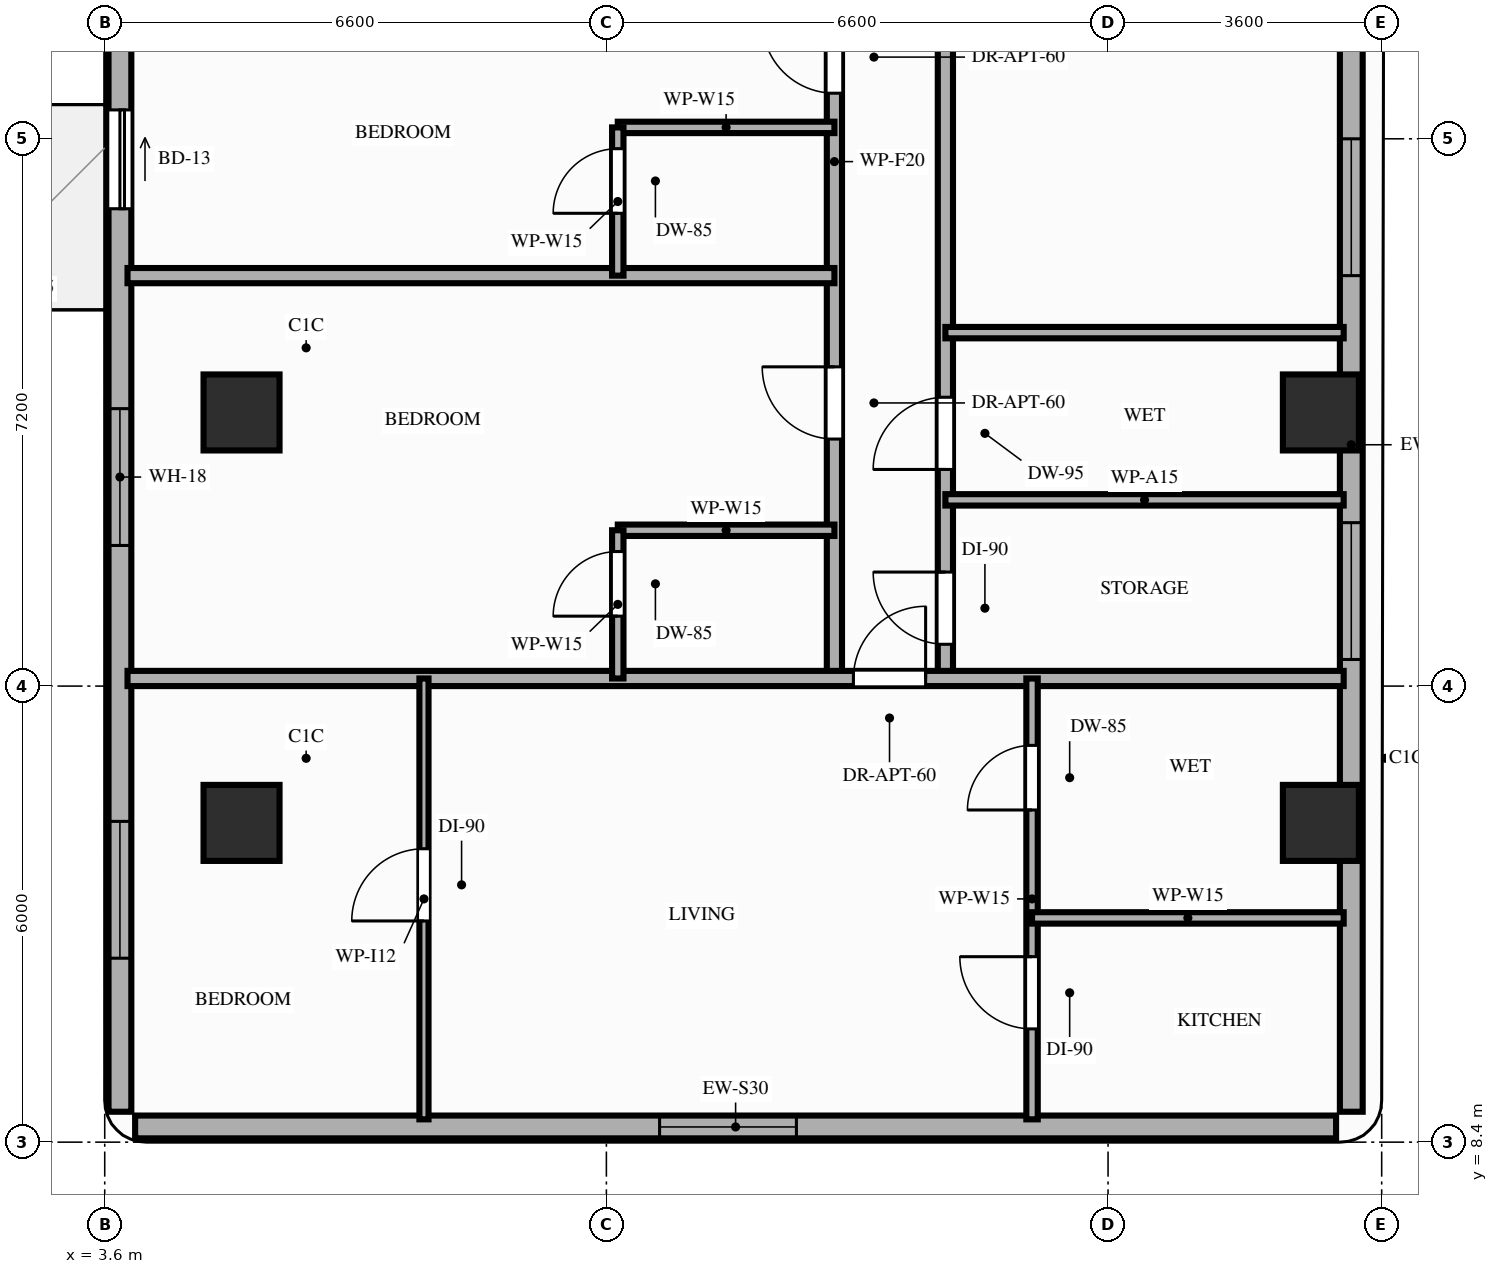
"""IFC4 building model, lengths in metres.
Left out: names, types, materials, properties, quantities, classifications, styles, units other than length and angle.
Written with IfcOpenShell. Run it as: python <this file> out.ifc"""

import sys

from ifc_helpers import new_model, si_unit, direction, frame, frame_2d, origin, origin_2d, place, context, subcontext, project, spatial, rectangle, extrude, element, fill, save


model = new_model("IFC4")
c1 = context("Model", 3, precision=1e-05, world=origin(), true_north=direction((0.0, 1.0)))
c2 = subcontext(c1, "Body", "Model", "MODEL_VIEW")
j1 = project(units=[si_unit("LENGTHUNIT", "METRE"), si_unit("PLANEANGLEUNIT", "RADIAN")], contexts=[c1])
p1 = place(None, origin())
s1 = spatial("IfcSite", under=j1, at=p1, CompositionType="ELEMENT")
p2 = place(p1, origin())
s2 = spatial("IfcBuilding", under=s1, at=p2, CompositionType="ELEMENT")
p3 = place(p2, frame((0.0, 0.0, 110.6)))
s3 = spatial("IfcBuildingStorey", under=s2, at=p3, CompositionType="ELEMENT", Elevation=110.6)
for number, where, z_axis, x_axis in (
    (1, (5.4, 12.6, 0.0), (0.0, 0.0, 1.0), (1.0, 0.0, 0.0)),
    (2, (19.6, 12.6, 0.0), (0.0, 0.0, 1.0), (1.0, 0.0, 0.0)),
    (3, (5.4, 18.0, 0.0), (0.0, 0.0, 1.0), (1.0, 0.0, 0.0)),
    (4, (19.6, 18.0, 0.0), (0.0, 0.0, 1.0), (1.0, 0.0, 0.0)),
):
    element("IfcColumn", number, at=place(p3, frame(where, z_axis=z_axis, x_axis=x_axis)), inside=s3, PredefinedType="COLUMN", context=c2, shape_type="SweptSolid", body=[
        extrude(rectangle(XDim=1.0, YDim=1.0, at=origin_2d()), origin(), (0.0, 0.0, 1.0), 3.2),
    ])
p4 = place(p3, frame((4.0, 8.6, 0.0), z_axis=(0.0, 0.0, 1.0), x_axis=(1.0, 0.0, 0.0)))
e5 = element("IfcWall", 5, at=p4, inside=s3, PredefinedType="STANDARD", context=c2, shape_type="SweptSolid", body=[
    extrude(rectangle(XDim=15.8, YDim=0.3, at=frame_2d((7.9, 0.0))), origin(), (0.0, 0.0, 1.0), 3.02),
])
p5 = place(p4, frame((6.9, 0.0, 0.85)))
e6 = element("IfcOpeningElement", 6, at=p5, cuts=e5, PredefinedType="OPENING", context=c2, shape_type="SweptSolid", body=[
    extrude(rectangle(XDim=1.8, YDim=1.75, at=frame_2d((0.9, 0.875))), frame((0.0, 0.16, 0.0), z_axis=(0.0, -1.0, 0.0), x_axis=(1.0, 0.0, 0.0)), (0.0, 0.0, 1.0), 0.32),
])
p6 = place(p3, frame((3.8, 42.1, 0.0), z_axis=(0.0, 0.0, 1.0), x_axis=(0.0, -1.0, 0.0)))
e7 = element("IfcWall", 7, at=p6, inside=s3, PredefinedType="STANDARD", context=c2, shape_type="SweptSolid", body=[
    extrude(rectangle(XDim=33.3, YDim=0.3, at=frame_2d((16.65, 0.0))), origin(), (0.0, 0.0, 1.0), 2.7),
])
p7 = place(p6, frame((20.12, 0.0, 0.0)))
e8 = element("IfcOpeningElement", 8, at=p7, cuts=e7, PredefinedType="OPENING", context=c2, shape_type="SweptSolid", body=[
    extrude(rectangle(XDim=1.3, YDim=2.08, at=frame_2d((0.65, 1.04))), frame((0.0, 0.16, 0.0), z_axis=(0.0, -1.0, 0.0), x_axis=(1.0, 0.0, 0.0)), (0.0, 0.0, 1.0), 0.32),
])
p8 = place(p6, frame((24.05, 0.0, 0.85)))
e9 = element("IfcOpeningElement", 9, at=p8, cuts=e7, PredefinedType="OPENING", context=c2, shape_type="SweptSolid", body=[
    extrude(rectangle(XDim=1.8, YDim=1.6, at=frame_2d((0.9, 0.8))), frame((0.0, 0.16, 0.0), z_axis=(0.0, -1.0, 0.0), x_axis=(1.0, 0.0, 0.0)), (0.0, 0.0, 1.0), 0.32),
])
p9 = place(p6, frame((29.48, 0.0, 0.85)))
e10 = element("IfcOpeningElement", 10, at=p9, cuts=e7, PredefinedType="OPENING", context=c2, shape_type="SweptSolid", body=[
    extrude(rectangle(XDim=1.8, YDim=1.6, at=frame_2d((0.9, 0.8))), frame((0.0, 0.16, 0.0), z_axis=(0.0, -1.0, 0.0), x_axis=(1.0, 0.0, 0.0)), (0.0, 0.0, 1.0), 0.32),
])
p10 = place(p6, frame((15.1, 0.0, 0.85)))
e11 = element("IfcOpeningElement", 11, at=p10, cuts=e7, PredefinedType="OPENING", context=c2, shape_type="SweptSolid", body=[
    extrude(rectangle(XDim=1.8, YDim=1.6, at=frame_2d((0.9, 0.8))), frame((0.0, 0.16, 0.0), z_axis=(0.0, -1.0, 0.0), x_axis=(1.0, 0.0, 0.0)), (0.0, 0.0, 1.0), 0.32),
])
p11 = place(p6, frame((9.9, 0.0, 0.85)))
e12 = element("IfcOpeningElement", 12, at=p11, cuts=e7, PredefinedType="OPENING", context=c2, shape_type="SweptSolid", body=[
    extrude(rectangle(XDim=1.8, YDim=1.6, at=frame_2d((0.9, 0.8))), frame((0.0, 0.16, 0.0), z_axis=(0.0, -1.0, 0.0), x_axis=(1.0, 0.0, 0.0)), (0.0, 0.0, 1.0), 0.32),
])
p12 = place(p6, frame((3.8, 0.0, 0.85)))
e13 = element("IfcOpeningElement", 13, at=p12, cuts=e7, PredefinedType="OPENING", context=c2, shape_type="SweptSolid", body=[
    extrude(rectangle(XDim=1.8, YDim=1.6, at=frame_2d((0.9, 0.8))), frame((0.0, 0.16, 0.0), z_axis=(0.0, -1.0, 0.0), x_axis=(1.0, 0.0, 0.0)), (0.0, 0.0, 1.0), 0.32),
])
p13 = place(p3, frame((20.0, 8.8, 0.0), z_axis=(0.0, 0.0, 1.0), x_axis=(0.0, 1.0, 0.0)))
e14 = element("IfcWall", 14, at=p13, inside=s3, PredefinedType="STANDARD", context=c2, shape_type="SweptSolid", body=[
    extrude(rectangle(XDim=17.55, YDim=0.3, at=frame_2d((8.775, 0.0))), origin(), (0.0, 0.0, 1.0), 2.4),
])
p14 = place(p13, frame((5.95, 0.0, 0.85)))
e15 = element("IfcOpeningElement", 15, at=p14, cuts=e14, PredefinedType="OPENING", context=c2, shape_type="SweptSolid", body=[
    extrude(rectangle(XDim=1.8, YDim=1.3, at=frame_2d((0.9, 0.65))), frame((0.0, 0.16, 0.0), z_axis=(0.0, -1.0, 0.0), x_axis=(1.0, 0.0, 0.0)), (0.0, 0.0, 1.0), 0.32),
])
p15 = place(p13, frame((11.0, 0.0, 0.85)))
e16 = element("IfcOpeningElement", 16, at=p15, cuts=e14, PredefinedType="OPENING", context=c2, shape_type="SweptSolid", body=[
    extrude(rectangle(XDim=1.8, YDim=1.3, at=frame_2d((0.9, 0.65))), frame((0.0, 0.16, 0.0), z_axis=(0.0, -1.0, 0.0), x_axis=(1.0, 0.0, 0.0)), (0.0, 0.0, 1.0), 0.32),
])
p16 = place(p3, frame((13.2, 14.5, 0.0), z_axis=(0.0, 0.0, 1.0), x_axis=(0.0, 1.0, 0.0)))
e17 = element("IfcWall", 17, at=p16, inside=s3, PredefinedType="PARTITIONING", context=c2, shape_type="SweptSolid", body=[
    extrude(rectangle(XDim=13.6, YDim=0.2, at=frame_2d((6.8, 0.0))), origin(), (0.0, 0.0, 1.0), 2.4),
])
p17 = place(p16, frame((3.15, 0.0, 0.0)))
e18 = element("IfcOpeningElement", 18, at=p17, cuts=e17, PredefinedType="OPENING", context=c2, shape_type="SweptSolid", body=[
    extrude(rectangle(XDim=0.95, YDim=2.15, at=frame_2d((0.475, 1.075))), frame((0.0, 0.11, 0.0), z_axis=(0.0, -1.0, 0.0), x_axis=(1.0, 0.0, 0.0)), (0.0, 0.0, 1.0), 0.22),
])
p18 = place(p16, frame((7.7, 0.0, 0.0)))
e19 = element("IfcOpeningElement", 19, at=p18, cuts=e17, PredefinedType="OPENING", context=c2, shape_type="SweptSolid", body=[
    extrude(rectangle(XDim=0.95, YDim=2.15, at=frame_2d((0.475, 1.075))), frame((0.0, 0.11, 0.0), z_axis=(0.0, -1.0, 0.0), x_axis=(1.0, 0.0, 0.0)), (0.0, 0.0, 1.0), 0.22),
])
p19 = place(p16, frame((10.88, 0.0, 0.0)))
e20 = element("IfcOpeningElement", 20, at=p19, cuts=e17, PredefinedType="OPENING", context=c2, shape_type="SweptSolid", body=[
    extrude(rectangle(XDim=0.95, YDim=2.15, at=frame_2d((0.475, 1.075))), frame((0.0, 0.11, 0.0), z_axis=(0.0, -1.0, 0.0), x_axis=(1.0, 0.0, 0.0)), (0.0, 0.0, 1.0), 0.22),
])
p20 = place(p3, frame((14.66, 14.5, 0.0), z_axis=(0.0, 0.0, 1.0), x_axis=(0.0, 1.0, 0.0)))
e21 = element("IfcWall", 21, at=p20, inside=s3, PredefinedType="PARTITIONING", context=c2, shape_type="SweptSolid", body=[
    extrude(rectangle(XDim=13.6, YDim=0.2, at=frame_2d((6.8, 0.0))), origin(), (0.0, 0.0, 1.0), 2.4),
])
p21 = place(p20, frame((0.45, 0.0, 0.0)))
e22 = element("IfcOpeningElement", 22, at=p21, cuts=e21, PredefinedType="OPENING", context=c2, shape_type="SweptSolid", body=[
    extrude(rectangle(XDim=0.95, YDim=2.15, at=frame_2d((0.475, 1.075))), frame((0.0, 0.11, 0.0), z_axis=(0.0, -1.0, 0.0), x_axis=(1.0, 0.0, 0.0)), (0.0, 0.0, 1.0), 0.22),
])
p22 = place(p20, frame((2.75, 0.0, 0.0)))
e23 = element("IfcOpeningElement", 23, at=p22, cuts=e21, PredefinedType="OPENING", context=c2, shape_type="SweptSolid", body=[
    extrude(rectangle(XDim=0.95, YDim=2.1, at=frame_2d((0.475, 1.05))), frame((0.0, 0.11, 0.0), z_axis=(0.0, -1.0, 0.0), x_axis=(1.0, 0.0, 0.0)), (0.0, 0.0, 1.0), 0.22),
])
p23 = place(p20, frame((8.58, 0.0, 0.0)))
e24 = element("IfcOpeningElement", 24, at=p23, cuts=e21, PredefinedType="OPENING", context=c2, shape_type="SweptSolid", body=[
    extrude(rectangle(XDim=1.0, YDim=2.15, at=frame_2d((0.5, 1.075))), frame((0.0, 0.11, 0.0), z_axis=(0.0, -1.0, 0.0), x_axis=(1.0, 0.0, 0.0)), (0.0, 0.0, 1.0), 0.22),
])
p24 = place(p3, frame((3.9, 14.5, 0.0), z_axis=(0.0, 0.0, 1.0), x_axis=(1.0, 0.0, 0.0)))
e25 = element("IfcWall", 25, at=p24, inside=s3, PredefinedType="PARTITIONING", context=c2, shape_type="SweptSolid", body=[
    extrude(rectangle(XDim=16.0, YDim=0.2, at=frame_2d((8.0, 0.0))), origin(), (0.0, 0.0, 1.0), 2.4),
])
p25 = place(p24, frame((9.55, 0.0, 0.0)))
e26 = element("IfcOpeningElement", 26, at=p25, cuts=e25, PredefinedType="OPENING", context=c2, shape_type="SweptSolid", body=[
    extrude(rectangle(XDim=0.95, YDim=2.15, at=frame_2d((0.475, 1.075))), frame((0.0, 0.11, 0.0), z_axis=(0.0, -1.0, 0.0), x_axis=(1.0, 0.0, 0.0)), (0.0, 0.0, 1.0), 0.22),
])
p26 = place(p3, frame((10.35, 16.45, 0.0), z_axis=(0.0, 0.0, 1.0), x_axis=(1.0, 0.0, 0.0)))
e27 = element("IfcWall", 27, at=p26, inside=s3, PredefinedType="PARTITIONING", context=c2, shape_type="SweptSolid", body=[
    extrude(rectangle(XDim=2.85, YDim=0.15, at=frame_2d((1.425, 0.0))), origin(), (0.0, 0.0, 1.0), 2.7),
])
p27 = place(p3, frame((10.35, 14.5, 0.0), z_axis=(0.0, 0.0, 1.0), x_axis=(0.0, 1.0, 0.0)))
e28 = element("IfcWall", 28, at=p27, inside=s3, PredefinedType="PARTITIONING", context=c2, shape_type="SweptSolid", body=[
    extrude(rectangle(XDim=1.95, YDim=0.15, at=frame_2d((0.975, 0.0))), origin(), (0.0, 0.0, 1.0), 2.7),
])
p28 = place(p27, frame((0.82, 0.0, 0.0)))
e29 = element("IfcOpeningElement", 29, at=p28, cuts=e28, PredefinedType="OPENING", context=c2, shape_type="SweptSolid", body=[
    extrude(rectangle(XDim=0.85, YDim=2.1, at=frame_2d((0.425, 1.05))), frame((0.0, 0.085, 0.0), z_axis=(0.0, -1.0, 0.0), x_axis=(1.0, 0.0, 0.0)), (0.0, 0.0, 1.0), 0.17),
])
p29 = place(p3, frame((3.9, 19.8, 0.0), z_axis=(0.0, 0.0, 1.0), x_axis=(1.0, 0.0, 0.0)))
e30 = element("IfcWall", 30, at=p29, inside=s3, PredefinedType="PARTITIONING", context=c2, shape_type="SweptSolid", body=[
    extrude(rectangle(XDim=9.3, YDim=0.2, at=frame_2d((4.65, 0.0))), origin(), (0.0, 0.0, 1.0), 2.4),
])
p30 = place(p3, frame((10.35, 21.75, 0.0), z_axis=(0.0, 0.0, 1.0), x_axis=(1.0, 0.0, 0.0)))
e31 = element("IfcWall", 31, at=p30, inside=s3, PredefinedType="PARTITIONING", context=c2, shape_type="SweptSolid", body=[
    extrude(rectangle(XDim=2.85, YDim=0.15, at=frame_2d((1.425, 0.0))), origin(), (0.0, 0.0, 1.0), 2.6),
])
p31 = place(p3, frame((10.35, 19.8, 0.0), z_axis=(0.0, 0.0, 1.0), x_axis=(0.0, 1.0, 0.0)))
e32 = element("IfcWall", 32, at=p31, inside=s3, PredefinedType="PARTITIONING", context=c2, shape_type="SweptSolid", body=[
    extrude(rectangle(XDim=1.95, YDim=0.15, at=frame_2d((0.975, 0.0))), origin(), (0.0, 0.0, 1.0), 2.6),
])
p32 = place(p31, frame((0.82, 0.0, 0.0)))
e33 = element("IfcOpeningElement", 33, at=p32, cuts=e32, PredefinedType="OPENING", context=c2, shape_type="SweptSolid", body=[
    extrude(rectangle(XDim=0.85, YDim=2.1, at=frame_2d((0.425, 1.05))), frame((0.0, 0.085, 0.0), z_axis=(0.0, -1.0, 0.0), x_axis=(1.0, 0.0, 0.0)), (0.0, 0.0, 1.0), 0.17),
])
p33 = place(p3, frame((7.8, 8.7, 0.0), z_axis=(0.0, 0.0, 1.0), x_axis=(0.0, 1.0, 0.0)))
e34 = element("IfcWall", 34, at=p33, inside=s3, PredefinedType="PARTITIONING", context=c2, shape_type="SweptSolid", body=[
    extrude(rectangle(XDim=5.8, YDim=0.12, at=frame_2d((2.9, 0.0))), origin(), (0.0, 0.0, 1.0), 2.4),
])
p34 = place(p33, frame((2.61, 0.0, 0.0)))
e35 = element("IfcOpeningElement", 35, at=p34, cuts=e34, PredefinedType="OPENING", context=c2, shape_type="SweptSolid", body=[
    extrude(rectangle(XDim=0.95, YDim=2.15, at=frame_2d((0.475, 1.075))), frame((0.0, 0.07, 0.0), z_axis=(0.0, -1.0, 0.0), x_axis=(1.0, 0.0, 0.0)), (0.0, 0.0, 1.0), 0.14),
])
p35 = place(p3, frame((15.8, 8.7, 0.0), z_axis=(0.0, 0.0, 1.0), x_axis=(0.0, 1.0, 0.0)))
e36 = element("IfcWall", 36, at=p35, inside=s3, PredefinedType="PARTITIONING", context=c2, shape_type="SweptSolid", body=[
    extrude(rectangle(XDim=5.8, YDim=0.15, at=frame_2d((2.9, 0.0))), origin(), (0.0, 0.0, 1.0), 2.4),
])
p36 = place(p35, frame((1.19, 0.0, 0.0)))
e37 = element("IfcOpeningElement", 37, at=p36, cuts=e36, PredefinedType="OPENING", context=c2, shape_type="SweptSolid", body=[
    extrude(rectangle(XDim=0.95, YDim=2.15, at=frame_2d((0.475, 1.075))), frame((0.0, 0.085, 0.0), z_axis=(0.0, -1.0, 0.0), x_axis=(1.0, 0.0, 0.0)), (0.0, 0.0, 1.0), 0.17),
])
p37 = place(p35, frame((4.07, 0.0, 0.0)))
e38 = element("IfcOpeningElement", 38, at=p37, cuts=e36, PredefinedType="OPENING", context=c2, shape_type="SweptSolid", body=[
    extrude(rectangle(XDim=0.85, YDim=2.1, at=frame_2d((0.425, 1.05))), frame((0.0, 0.085, 0.0), z_axis=(0.0, -1.0, 0.0), x_axis=(1.0, 0.0, 0.0)), (0.0, 0.0, 1.0), 0.17),
])
p38 = place(p3, frame((15.8, 11.35, 0.0), z_axis=(0.0, 0.0, 1.0), x_axis=(1.0, 0.0, 0.0)))
e39 = element("IfcWall", 39, at=p38, inside=s3, PredefinedType="PARTITIONING", context=c2, shape_type="SweptSolid", body=[
    extrude(rectangle(XDim=4.1, YDim=0.15, at=frame_2d((2.05, 0.0))), origin(), (0.0, 0.0, 1.0), 3.02),
])
for number, where, z_axis, x_axis in (
    (40, (14.66, 16.85, 0.0), (0.0, 0.0, 1.0), (1.0, 0.0, 0.0)),
    (41, (14.66, 19.05, 0.0), (0.0, 0.0, 1.0), (1.0, 0.0, 0.0)),
):
    element("IfcWall", number, at=place(p3, frame(where, z_axis=z_axis, x_axis=x_axis)), inside=s3, PredefinedType="PARTITIONING", context=c2, shape_type="SweptSolid", body=[
        extrude(rectangle(XDim=5.24, YDim=0.15, at=frame_2d((2.62, 0.0))), origin(), (0.0, 0.0, 1.0), 2.4),
    ])
p39 = place(p7, origin())
e42 = element("IfcDoor", 42, at=p39, inside=s3, OperationType="SLIDING_TO_LEFT", PredefinedType="DOOR", context=c2, shape_type="SweptSolid", body=[
    extrude(rectangle(XDim=1.3, YDim=2.08, at=frame_2d((0.65, 1.04))), frame((0.0, 0.025, 0.0), z_axis=(0.0, -1.0, 0.0), x_axis=(1.0, 0.0, 0.0)), (0.0, 0.0, 1.0), 0.05),
])
fill(e8, e42)
p40 = place(p8, origin())
e43 = element("IfcWindow", 43, at=p40, inside=s3, PartitioningType="SINGLE_PANEL", PredefinedType="WINDOW", context=c2, shape_type="SweptSolid", body=[
    extrude(rectangle(XDim=1.8, YDim=1.6, at=frame_2d((0.9, 0.8))), frame((0.0, 0.03, 0.0), z_axis=(0.0, -1.0, 0.0), x_axis=(1.0, 0.0, 0.0)), (0.0, 0.0, 1.0), 0.06),
])
fill(e9, e43)
p41 = place(p9, origin())
e44 = element("IfcWindow", 44, at=p41, inside=s3, PartitioningType="SINGLE_PANEL", PredefinedType="WINDOW", context=c2, shape_type="SweptSolid", body=[
    extrude(rectangle(XDim=1.8, YDim=1.6, at=frame_2d((0.9, 0.8))), frame((0.0, 0.03, 0.0), z_axis=(0.0, -1.0, 0.0), x_axis=(1.0, 0.0, 0.0)), (0.0, 0.0, 1.0), 0.06),
])
fill(e10, e44)
p42 = place(p5, origin())
e45 = element("IfcWindow", 45, at=p42, inside=s3, PartitioningType="SINGLE_PANEL", PredefinedType="WINDOW", context=c2, shape_type="SweptSolid", body=[
    extrude(rectangle(XDim=1.8, YDim=1.75, at=frame_2d((0.9, 0.875))), frame((0.0, 0.03, 0.0), z_axis=(0.0, -1.0, 0.0), x_axis=(1.0, 0.0, 0.0)), (0.0, 0.0, 1.0), 0.06),
])
fill(e6, e45)
p43 = place(p14, origin())
e46 = element("IfcWindow", 46, at=p43, inside=s3, PartitioningType="SINGLE_PANEL", PredefinedType="WINDOW", context=c2, shape_type="SweptSolid", body=[
    extrude(rectangle(XDim=1.8, YDim=1.3, at=frame_2d((0.9, 0.65))), frame((0.0, 0.03, 0.0), z_axis=(0.0, -1.0, 0.0), x_axis=(1.0, 0.0, 0.0)), (0.0, 0.0, 1.0), 0.06),
])
fill(e15, e46)
p44 = place(p15, origin())
e47 = element("IfcWindow", 47, at=p44, inside=s3, PartitioningType="SINGLE_PANEL", PredefinedType="WINDOW", context=c2, shape_type="SweptSolid", body=[
    extrude(rectangle(XDim=1.8, YDim=1.3, at=frame_2d((0.9, 0.65))), frame((0.0, 0.03, 0.0), z_axis=(0.0, -1.0, 0.0), x_axis=(1.0, 0.0, 0.0)), (0.0, 0.0, 1.0), 0.06),
])
fill(e16, e47)
p45 = place(p28, origin())
e48 = element("IfcDoor", 48, at=p45, inside=s3, OperationType="SINGLE_SWING_LEFT", PredefinedType="DOOR", context=c2, shape_type="SweptSolid", body=[
    extrude(rectangle(XDim=0.85, YDim=2.1, at=frame_2d((0.425, 1.05))), frame((0.0, 0.025, 0.0), z_axis=(0.0, -1.0, 0.0), x_axis=(1.0, 0.0, 0.0)), (0.0, 0.0, 1.0), 0.05),
])
fill(e29, e48)
p46 = place(p17, origin())
e49 = element("IfcDoor", 49, at=p46, inside=s3, OperationType="SINGLE_SWING_RIGHT", PredefinedType="DOOR", context=c2, shape_type="SweptSolid", body=[
    extrude(rectangle(XDim=0.95, YDim=2.15, at=frame_2d((0.475, 1.075))), frame((0.0, 0.025, 0.0), z_axis=(0.0, -1.0, 0.0), x_axis=(1.0, 0.0, 0.0)), (0.0, 0.0, 1.0), 0.05),
])
fill(e18, e49)
p47 = place(p32, origin())
e50 = element("IfcDoor", 50, at=p47, inside=s3, OperationType="SINGLE_SWING_LEFT", PredefinedType="DOOR", context=c2, shape_type="SweptSolid", body=[
    extrude(rectangle(XDim=0.85, YDim=2.1, at=frame_2d((0.425, 1.05))), frame((0.0, 0.025, 0.0), z_axis=(0.0, -1.0, 0.0), x_axis=(1.0, 0.0, 0.0)), (0.0, 0.0, 1.0), 0.05),
])
fill(e33, e50)
p48 = place(p18, origin())
e51 = element("IfcDoor", 51, at=p48, inside=s3, OperationType="SINGLE_SWING_RIGHT", PredefinedType="DOOR", context=c2, shape_type="SweptSolid", body=[
    extrude(rectangle(XDim=0.95, YDim=2.15, at=frame_2d((0.475, 1.075))), frame((0.0, 0.025, 0.0), z_axis=(0.0, -1.0, 0.0), x_axis=(1.0, 0.0, 0.0)), (0.0, 0.0, 1.0), 0.05),
])
fill(e19, e51)
p49 = place(p25, origin())
e52 = element("IfcDoor", 52, at=p49, inside=s3, OperationType="SINGLE_SWING_RIGHT", PredefinedType="DOOR", context=c2, shape_type="SweptSolid", body=[
    extrude(rectangle(XDim=0.95, YDim=2.15, at=frame_2d((0.475, 1.075))), frame((0.0, 0.025, 0.0), z_axis=(0.0, -1.0, 0.0), x_axis=(1.0, 0.0, 0.0)), (0.0, 0.0, 1.0), 0.05),
])
fill(e26, e52)
p50 = place(p34, origin())
e53 = element("IfcDoor", 53, at=p50, inside=s3, OperationType="SINGLE_SWING_LEFT", PredefinedType="DOOR", context=c2, shape_type="SweptSolid", body=[
    extrude(rectangle(XDim=0.95, YDim=2.15, at=frame_2d((0.475, 1.075))), frame((0.0, 0.025, 0.0), z_axis=(0.0, -1.0, 0.0), x_axis=(1.0, 0.0, 0.0)), (0.0, 0.0, 1.0), 0.05),
])
fill(e35, e53)
p51 = place(p36, origin())
e54 = element("IfcDoor", 54, at=p51, inside=s3, OperationType="SINGLE_SWING_RIGHT", PredefinedType="DOOR", context=c2, shape_type="SweptSolid", body=[
    extrude(rectangle(XDim=0.95, YDim=2.15, at=frame_2d((0.475, 1.075))), frame((0.0, 0.025, 0.0), z_axis=(0.0, -1.0, 0.0), x_axis=(1.0, 0.0, 0.0)), (0.0, 0.0, 1.0), 0.05),
])
fill(e37, e54)
p52 = place(p37, origin())
e55 = element("IfcDoor", 55, at=p52, inside=s3, OperationType="SINGLE_SWING_LEFT", PredefinedType="DOOR", context=c2, shape_type="SweptSolid", body=[
    extrude(rectangle(XDim=0.85, YDim=2.1, at=frame_2d((0.425, 1.05))), frame((0.0, 0.025, 0.0), z_axis=(0.0, -1.0, 0.0), x_axis=(1.0, 0.0, 0.0)), (0.0, 0.0, 1.0), 0.05),
])
fill(e38, e55)
p53 = place(p21, origin())
e56 = element("IfcDoor", 56, at=p53, inside=s3, OperationType="SINGLE_SWING_RIGHT", PredefinedType="DOOR", context=c2, shape_type="SweptSolid", body=[
    extrude(rectangle(XDim=0.95, YDim=2.15, at=frame_2d((0.475, 1.075))), frame((0.0, 0.025, 0.0), z_axis=(0.0, -1.0, 0.0), x_axis=(1.0, 0.0, 0.0)), (0.0, 0.0, 1.0), 0.05),
])
fill(e22, e56)
p54 = place(p22, origin())
e57 = element("IfcDoor", 57, at=p54, inside=s3, OperationType="SINGLE_SWING_LEFT", PredefinedType="DOOR", context=c2, shape_type="SweptSolid", body=[
    extrude(rectangle(XDim=0.95, YDim=2.1, at=frame_2d((0.475, 1.05))), frame((0.0, 0.025, 0.0), z_axis=(0.0, -1.0, 0.0), x_axis=(1.0, 0.0, 0.0)), (0.0, 0.0, 1.0), 0.05),
])
fill(e23, e57)
save(model, sys.argv[1])
